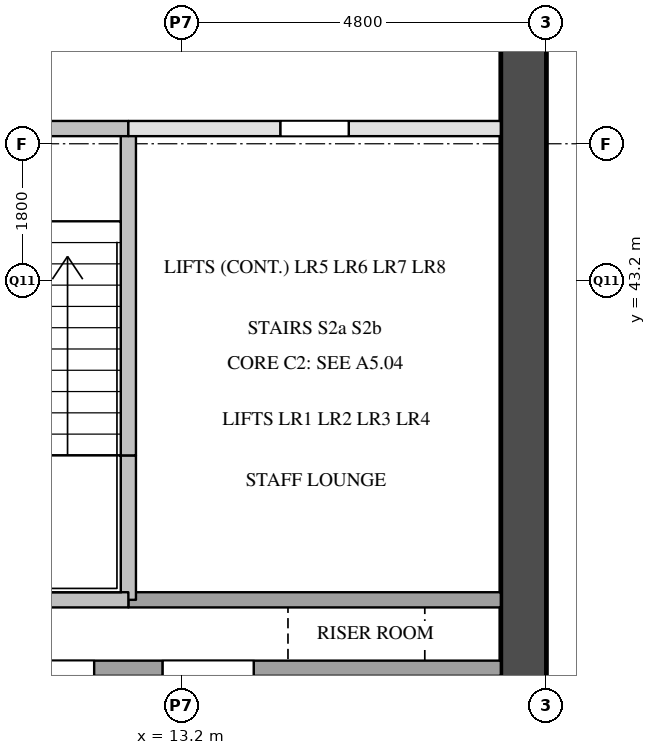
"""IFC4 building model, lengths in metres.
Left out: names, types, materials, properties, quantities, classifications, styles, units other than length and angle.
Written with IfcOpenShell. Run it as: python <this file> out.ifc"""

import sys

from ifc_helpers import new_model, si_unit, direction, frame, frame_2d, origin, place, context, subcontext, project, spatial, rectangle, extrude, element, fill, save


model = new_model("IFC4")
c1 = context("Model", 3, precision=1e-05, world=origin(), true_north=direction((0.0, 1.0)))
c2 = subcontext(c1, "Body", "Model", "MODEL_VIEW")
j1 = project(units=[si_unit("LENGTHUNIT", "METRE"), si_unit("PLANEANGLEUNIT", "RADIAN")], contexts=[c1])
p1 = place(None, origin())
s1 = spatial("IfcSite", under=j1, at=p1, CompositionType="ELEMENT")
p2 = place(p1, origin())
s2 = spatial("IfcBuilding", under=s1, at=p2, CompositionType="ELEMENT")
p3 = place(p2, frame((0.0, 0.0, 104.4)))
s3 = spatial("IfcBuildingStorey", under=s2, at=p3, CompositionType="ELEMENT", Elevation=104.4)
p4 = place(p3, frame((17.7, 29.1, 0.0), z_axis=(0.0, 0.0, 1.0), x_axis=(0.0, 1.0, 0.0)))
e1 = element("IfcWall", 1, at=p4, inside=s3, PredefinedType="SHEAR", context=c2, shape_type="SweptSolid", body=[
    extrude(rectangle(XDim=20.3, YDim=0.6, at=frame_2d((10.15, 0.0))), origin(), (0.0, 0.0, 1.0), 3.5),
])
p5 = place(p4, frame((1.25, 0.0, 0.0)))
e2 = element("IfcOpeningElement", 2, at=p5, cuts=e1, PredefinedType="OPENING", context=c2, shape_type="SweptSolid", body=[
    extrude(rectangle(XDim=0.7, YDim=2.1, at=frame_2d((0.35, 1.05))), frame((0.0, 0.31, 0.0), z_axis=(0.0, -1.0, 0.0), x_axis=(1.0, 0.0, 0.0)), (0.0, 0.0, 1.0), 0.62),
])
p6 = place(p4, frame((7.05, 0.0, 0.0)))
e3 = element("IfcOpeningElement", 3, at=p6, cuts=e1, PredefinedType="OPENING", context=c2, shape_type="SweptSolid", body=[
    extrude(rectangle(XDim=0.7, YDim=2.1, at=frame_2d((0.35, 1.05))), frame((0.0, 0.31, 0.0), z_axis=(0.0, -1.0, 0.0), x_axis=(1.0, 0.0, 0.0)), (0.0, 0.0, 1.0), 0.62),
])
p7 = place(p3, frame((12.5, 34.9, 0.0), z_axis=(0.0, 0.0, 1.0), x_axis=(0.0, 1.0, 0.0)))
e4 = element("IfcWall", 4, at=p7, inside=s3, PredefinedType="SOLIDWALL", context=c2, shape_type="SweptSolid", body=[
    extrude(rectangle(XDim=3.2, YDim=0.2, at=frame_2d((1.6, 0.0))), origin(), (0.0, 0.0, 1.0), 3.5),
])
p8 = place(p3, frame((12.5, 39.0, 0.0), z_axis=(0.0, 0.0, 1.0), x_axis=(0.0, 1.0, 0.0)))
e5 = element("IfcWall", 5, at=p8, inside=s3, PredefinedType="SOLIDWALL", context=c2, shape_type="SweptSolid", body=[
    extrude(rectangle(XDim=1.9, YDim=0.2, at=frame_2d((0.95, 0.0))), origin(), (0.0, 0.0, 1.0), 3.5),
])
p9 = place(p3, frame((12.5, 40.9, 0.0), z_axis=(0.0, 0.0, 1.0), x_axis=(0.0, 1.0, 0.0)))
e6 = element("IfcWall", 6, at=p9, inside=s3, PredefinedType="SOLIDWALL", context=c2, shape_type="SweptSolid", body=[
    extrude(rectangle(XDim=4.3, YDim=0.2, at=frame_2d((2.15, 0.0))), origin(), (0.0, 0.0, 1.0), 3.5),
])
for number, where, z_axis, x_axis in (
    (7, (14.6, 34.9, 0.0), (0.0, 0.0, 1.0), (0.0, 1.0, 0.0)),
    (8, (16.7, 34.9, 0.0), (0.0, 0.0, 1.0), (0.0, 1.0, 0.0)),
):
    element("IfcWall", number, at=place(p3, frame(where, z_axis=z_axis, x_axis=x_axis)), inside=s3, PredefinedType="SOLIDWALL", context=c2, shape_type="SweptSolid", body=[
        extrude(rectangle(XDim=3.2, YDim=0.2, at=frame_2d((1.6, 0.0))), origin(), (0.0, 0.0, 1.0), 3.5),
    ])
p10 = place(p3, frame((6.2, 38.1, 0.0), z_axis=(0.0, 0.0, 1.0), x_axis=(1.0, 0.0, 0.0)))
e9 = element("IfcWall", 9, at=p10, inside=s3, PredefinedType="SOLIDWALL", context=c2, shape_type="SweptSolid", body=[
    extrude(rectangle(XDim=11.2, YDim=0.2, at=frame_2d((5.6, 0.0))), origin(), (0.0, 0.0, 1.0), 3.5),
])
p11 = place(p10, frame((0.45, 0.0, 0.0)))
e10 = element("IfcOpeningElement", 10, at=p11, cuts=e9, PredefinedType="OPENING", context=c2, shape_type="SweptSolid", body=[
    extrude(rectangle(XDim=1.2, YDim=2.1, at=frame_2d((0.6, 1.05))), frame((0.0, 0.11, 0.0), z_axis=(0.0, -1.0, 0.0), x_axis=(1.0, 0.0, 0.0)), (0.0, 0.0, 1.0), 0.22),
])
p12 = place(p10, frame((2.55, 0.0, 0.0)))
e11 = element("IfcOpeningElement", 11, at=p12, cuts=e9, PredefinedType="OPENING", context=c2, shape_type="SweptSolid", body=[
    extrude(rectangle(XDim=1.2, YDim=2.1, at=frame_2d((0.6, 1.05))), frame((0.0, 0.11, 0.0), z_axis=(0.0, -1.0, 0.0), x_axis=(1.0, 0.0, 0.0)), (0.0, 0.0, 1.0), 0.22),
])
p13 = place(p10, frame((4.65, 0.0, 0.0)))
e12 = element("IfcOpeningElement", 12, at=p13, cuts=e9, PredefinedType="OPENING", context=c2, shape_type="SweptSolid", body=[
    extrude(rectangle(XDim=1.2, YDim=2.1, at=frame_2d((0.6, 1.05))), frame((0.0, 0.11, 0.0), z_axis=(0.0, -1.0, 0.0), x_axis=(1.0, 0.0, 0.0)), (0.0, 0.0, 1.0), 0.22),
])
p14 = place(p10, frame((6.75, 0.0, 0.0)))
e13 = element("IfcOpeningElement", 13, at=p14, cuts=e9, PredefinedType="OPENING", context=c2, shape_type="SweptSolid", body=[
    extrude(rectangle(XDim=1.2, YDim=2.1, at=frame_2d((0.6, 1.05))), frame((0.0, 0.11, 0.0), z_axis=(0.0, -1.0, 0.0), x_axis=(1.0, 0.0, 0.0)), (0.0, 0.0, 1.0), 0.22),
])
p15 = place(p3, frame((12.5, 39.0, 0.0), z_axis=(0.0, 0.0, 1.0), x_axis=(1.0, 0.0, 0.0)))
e14 = element("IfcWall", 14, at=p15, inside=s3, PredefinedType="SOLIDWALL", context=c2, shape_type="SweptSolid", body=[
    extrude(rectangle(XDim=4.9, YDim=0.2, at=frame_2d((2.45, 0.0))), origin(), (0.0, 0.0, 1.0), 3.5),
])
p16 = place(p3, frame((9.45, 39.0, 0.0), z_axis=(0.0, 0.0, 1.0), x_axis=(1.0, 0.0, 0.0)))
e15 = element("IfcWall", 15, at=p16, inside=s3, PredefinedType="SOLIDWALL", context=c2, shape_type="SweptSolid", body=[
    extrude(rectangle(XDim=3.05, YDim=0.2, at=frame_2d((1.525, 0.0))), origin(), (0.0, 0.0, 1.0), 3.5),
])
p17 = place(p3, frame((12.5, 45.2, 0.0), z_axis=(0.0, 0.0, 1.0), x_axis=(1.0, 0.0, 0.0)))
e16 = element("IfcWall", 16, at=p17, inside=s3, PredefinedType="PARTITIONING", context=c2, shape_type="SweptSolid", body=[
    extrude(rectangle(XDim=4.9, YDim=0.2, at=frame_2d((2.45, 0.0))), origin(), (0.0, 0.0, 1.0), 3.5),
])
p18 = place(p17, frame((2.0, 0.0, 0.0)))
e17 = element("IfcOpeningElement", 17, at=p18, cuts=e16, PredefinedType="OPENING", context=c2, shape_type="SweptSolid", body=[
    extrude(rectangle(XDim=0.9, YDim=2.1, at=frame_2d((0.45, 1.05))), frame((0.0, 0.11, 0.0), z_axis=(0.0, -1.0, 0.0), x_axis=(1.0, 0.0, 0.0)), (0.0, 0.0, 1.0), 0.22),
])
p19 = place(p3, frame((6.2, 45.2, 0.0), z_axis=(0.0, 0.0, 1.0), x_axis=(1.0, 0.0, 0.0)))
e18 = element("IfcWall", 18, at=p19, inside=s3, PredefinedType="SOLIDWALL", context=c2, shape_type="SweptSolid", body=[
    extrude(rectangle(XDim=6.3, YDim=0.2, at=frame_2d((3.15, 0.0))), origin(), (0.0, 0.0, 1.0), 3.5),
])
p20 = place(p19, frame((1.025, 0.0, 0.0)))
e19 = element("IfcOpeningElement", 19, at=p20, cuts=e18, PredefinedType="OPENING", context=c2, shape_type="SweptSolid", body=[
    extrude(rectangle(XDim=1.1, YDim=2.1, at=frame_2d((0.55, 1.05))), frame((0.0, 0.11, 0.0), z_axis=(0.0, -1.0, 0.0), x_axis=(1.0, 0.0, 0.0)), (0.0, 0.0, 1.0), 0.22),
])
p21 = place(p19, frame((4.175, 0.0, 0.0)))
e20 = element("IfcOpeningElement", 20, at=p21, cuts=e18, PredefinedType="OPENING", context=c2, shape_type="SweptSolid", body=[
    extrude(rectangle(XDim=1.1, YDim=2.1, at=frame_2d((0.55, 1.05))), frame((0.0, 0.11, 0.0), z_axis=(0.0, -1.0, 0.0), x_axis=(1.0, 0.0, 0.0)), (0.0, 0.0, 1.0), 0.22),
])
p22 = place(p13, origin())
e21 = element("IfcDoor", 21, at=p22, inside=s3, OperationType="SLIDING_TO_LEFT", PredefinedType="DOOR", context=c2, shape_type="SweptSolid", body=[
    extrude(rectangle(XDim=1.2, YDim=2.1, at=frame_2d((0.6, 1.05))), frame((0.0, 0.025, 0.0), z_axis=(0.0, -1.0, 0.0), x_axis=(1.0, 0.0, 0.0)), (0.0, 0.0, 1.0), 0.05),
])
fill(e12, e21)
p23 = place(p14, origin())
e22 = element("IfcDoor", 22, at=p23, inside=s3, OperationType="SLIDING_TO_LEFT", PredefinedType="DOOR", context=c2, shape_type="SweptSolid", body=[
    extrude(rectangle(XDim=1.2, YDim=2.1, at=frame_2d((0.6, 1.05))), frame((0.0, 0.025, 0.0), z_axis=(0.0, -1.0, 0.0), x_axis=(1.0, 0.0, 0.0)), (0.0, 0.0, 1.0), 0.05),
])
fill(e13, e22)
p24 = place(p18, origin())
e23 = element("IfcDoor", 23, at=p24, inside=s3, OperationType="SINGLE_SWING_RIGHT", PredefinedType="DOOR", context=c2, shape_type="SweptSolid", body=[
    extrude(rectangle(XDim=0.9, YDim=2.1, at=frame_2d((0.45, 1.05))), frame((0.0, 0.025, 0.0), z_axis=(0.0, -1.0, 0.0), x_axis=(1.0, 0.0, 0.0)), (0.0, 0.0, 1.0), 0.05),
])
fill(e17, e23)
save(model, sys.argv[1])
